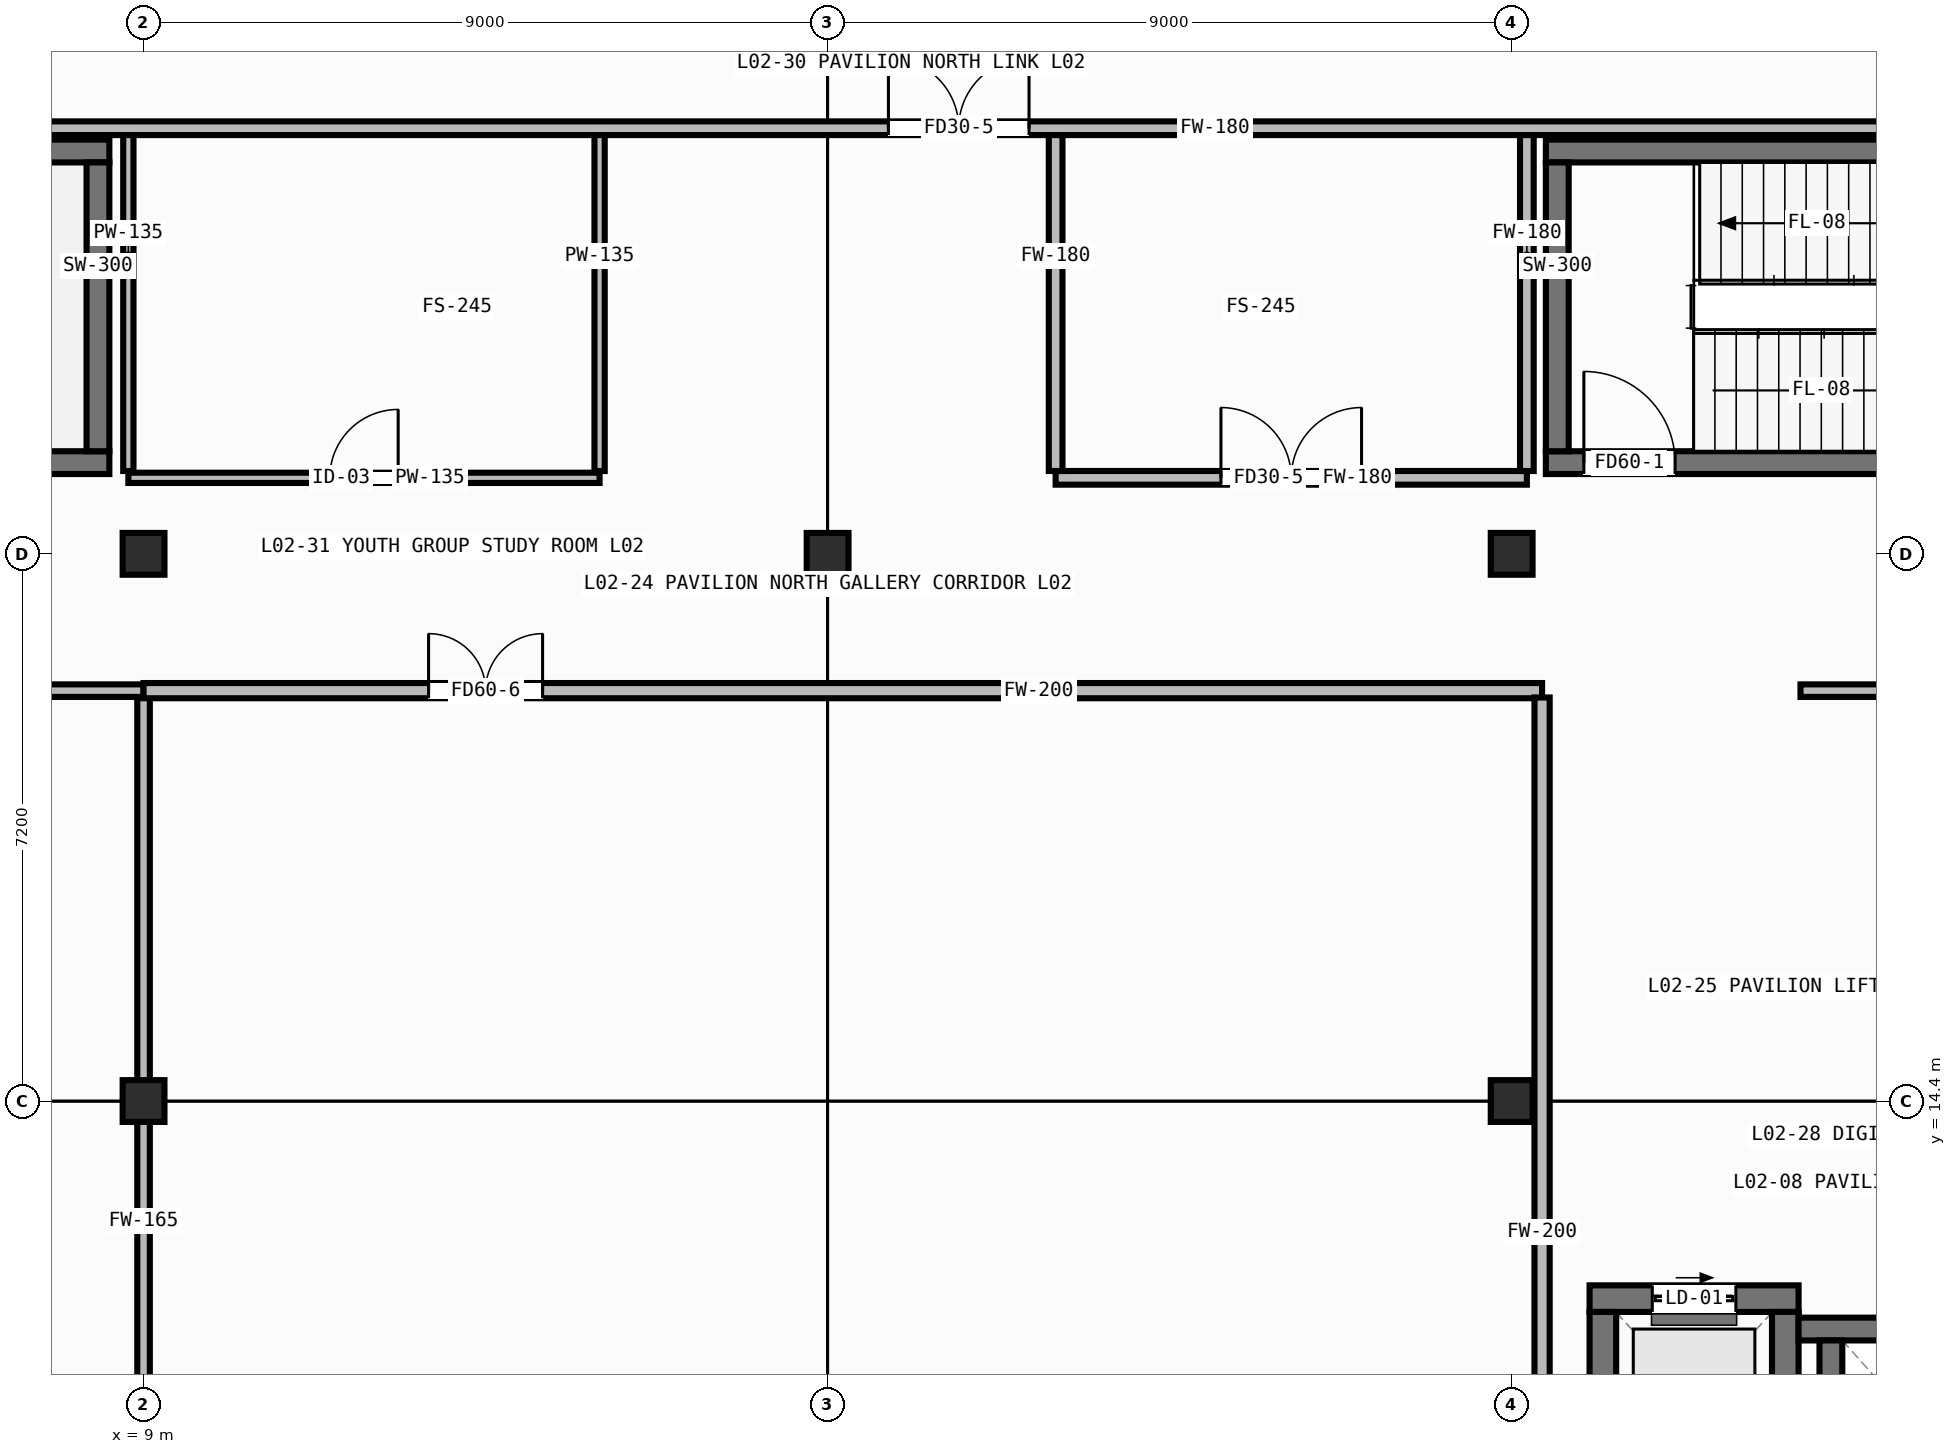
"""IFC4 building model, lengths in metres.
Left out: names, types, materials, properties, quantities, classifications, styles, units other than length and angle.
Written with IfcOpenShell. Run it as: python <this file> out.ifc"""

import sys

from ifc_helpers import new_model, si_unit, direction, frame, frame_2d, origin, origin_2d, place, context, subcontext, project, spatial, rectangle, hollow_rectangle, extrude, element, fill, save


model = new_model("IFC4")
c1 = context("Model", 3, precision=1e-05, world=origin(), true_north=direction((0.0, 1.0)))
c2 = subcontext(c1, "Body", "Model", "MODEL_VIEW")
j1 = project(units=[si_unit("LENGTHUNIT", "METRE"), si_unit("PLANEANGLEUNIT", "RADIAN")], contexts=[c1])
p1 = place(None, origin())
s1 = spatial("IfcSite", under=j1, at=p1, CompositionType="ELEMENT")
p2 = place(p1, origin())
s2 = spatial("IfcBuilding", under=s1, at=p2, CompositionType="ELEMENT")
p3 = place(p2, frame((0.0, 0.0, 4.8)))
s3 = spatial("IfcBuildingStorey", under=s2, at=p3, CompositionType="ELEMENT", Elevation=4.8)
for number, where, z_axis, x_axis in (
    (1, (9.0, 14.4, 0.0), (0.0, 0.0, 1.0), (1.0, 0.0, 0.0)),
    (2, (9.0, 21.6, 0.0), (0.0, 0.0, 1.0), (1.0, 0.0, 0.0)),
    (3, (18.0, 21.6, 0.0), (0.0, 0.0, 1.0), (1.0, 0.0, 0.0)),
    (4, (27.0, 14.4, 0.0), (0.0, 0.0, 1.0), (1.0, 0.0, 0.0)),
    (5, (27.0, 21.6, 0.0), (0.0, 0.0, 1.0), (1.0, 0.0, 0.0)),
):
    element("IfcColumn", number, at=place(p3, frame(where, z_axis=z_axis, x_axis=x_axis)), inside=s3, PredefinedType="COLUMN", context=c2, shape_type="SweptSolid", body=[
        extrude(hollow_rectangle(XDim=0.55, YDim=0.55, WallThickness=0.022, at=origin_2d()), origin(), (0.0, 0.0, 1.0), 4.0),
    ])
p4 = place(p3, frame((0.45, 22.8, 0.0), z_axis=(0.0, 0.0, 1.0), x_axis=(1.0, 0.0, 0.0)))
e6 = element("IfcWall", 6, at=p4, inside=s3, PredefinedType="SHEAR", context=c2, shape_type="SweptSolid", body=[
    extrude(rectangle(XDim=8.1, YDim=0.3, at=frame_2d((4.05, 0.0))), origin(), (0.0, 0.0, 1.0), 3.755),
])
p5 = place(p4, frame((0.5, 0.0, 0.0)))
e7 = element("IfcOpeningElement", 7, at=p5, cuts=e6, PredefinedType="OPENING", context=c2, shape_type="SweptSolid", body=[
    extrude(rectangle(XDim=1.2, YDim=2.1, at=frame_2d((0.6, 1.05))), frame((0.0, 0.162, 0.0), z_axis=(0.0, -1.0, 0.0), x_axis=(1.0, 0.0, 0.0)), (0.0, 0.0, 1.0), 0.324),
])
p6 = place(p3, frame((0.45, 26.9, 0.0), z_axis=(0.0, 0.0, 1.0), x_axis=(1.0, 0.0, 0.0)))
e8 = element("IfcWall", 8, at=p6, inside=s3, PredefinedType="SHEAR", context=c2, shape_type="SweptSolid", body=[
    extrude(rectangle(XDim=8.1, YDim=0.3, at=frame_2d((4.05, 0.0))), origin(), (0.0, 0.0, 1.0), 3.755),
])
p7 = place(p3, frame((8.4, 22.95, 0.0), z_axis=(0.0, 0.0, 1.0), x_axis=(0.0, 1.0, 0.0)))
e9 = element("IfcWall", 9, at=p7, inside=s3, PredefinedType="SHEAR", context=c2, shape_type="SweptSolid", body=[
    extrude(rectangle(XDim=3.8, YDim=0.3, at=frame_2d((1.9, 0.0))), origin(), (0.0, 0.0, 1.0), 3.755),
])
p8 = place(p3, frame((27.45, 22.8, 0.0), z_axis=(0.0, 0.0, 1.0), x_axis=(1.0, 0.0, 0.0)))
e10 = element("IfcWall", 10, at=p8, inside=s3, PredefinedType="SHEAR", context=c2, shape_type="SweptSolid", body=[
    extrude(rectangle(XDim=8.1, YDim=0.3, at=frame_2d((4.05, 0.0))), origin(), (0.0, 0.0, 1.0), 3.755),
])
p9 = place(p8, frame((0.5, 0.0, 0.0)))
e11 = element("IfcOpeningElement", 11, at=p9, cuts=e10, PredefinedType="OPENING", context=c2, shape_type="SweptSolid", body=[
    extrude(rectangle(XDim=1.2, YDim=2.1, at=frame_2d((0.6, 1.05))), frame((0.0, 0.162, 0.0), z_axis=(0.0, -1.0, 0.0), x_axis=(1.0, 0.0, 0.0)), (0.0, 0.0, 1.0), 0.324),
])
p10 = place(p3, frame((27.45, 26.9, 0.0), z_axis=(0.0, 0.0, 1.0), x_axis=(1.0, 0.0, 0.0)))
e12 = element("IfcWall", 12, at=p10, inside=s3, PredefinedType="SHEAR", context=c2, shape_type="SweptSolid", body=[
    extrude(rectangle(XDim=8.1, YDim=0.3, at=frame_2d((4.05, 0.0))), origin(), (0.0, 0.0, 1.0), 3.755),
])
p11 = place(p3, frame((27.6, 22.95, 0.0), z_axis=(0.0, 0.0, 1.0), x_axis=(0.0, 1.0, 0.0)))
e13 = element("IfcWall", 13, at=p11, inside=s3, PredefinedType="SHEAR", context=c2, shape_type="SweptSolid", body=[
    extrude(rectangle(XDim=3.8, YDim=0.3, at=frame_2d((1.9, 0.0))), origin(), (0.0, 0.0, 1.0), 3.755),
])
p12 = place(p3, frame((28.025, 11.8, 0.0), z_axis=(0.0, 0.0, 1.0), x_axis=(1.0, 0.0, 0.0)))
e14 = element("IfcWall", 14, at=p12, inside=s3, PredefinedType="SHEAR", context=c2, shape_type="SweptSolid", body=[
    extrude(rectangle(XDim=2.75, YDim=0.35, at=frame_2d((1.375, 0.0))), origin(), (0.0, 0.0, 1.0), 3.755),
])
p13 = place(p12, frame((0.825, 0.0, 0.0)))
e15 = element("IfcOpeningElement", 15, at=p13, cuts=e14, PredefinedType="OPENING", context=c2, shape_type="SweptSolid", body=[
    extrude(rectangle(XDim=1.1, YDim=2.1, at=frame_2d((0.55, 1.05))), frame((0.0, 0.187, 0.0), z_axis=(0.0, -1.0, 0.0), x_axis=(1.0, 0.0, 0.0)), (0.0, 0.0, 1.0), 0.374),
])
for number, where, z_axis, x_axis in (
    (16, (28.2, 9.375, 0.0), (0.0, 0.0, 1.0), (0.0, 1.0, 0.0)),
    (17, (30.6, 9.375, 0.0), (0.0, 0.0, 1.0), (0.0, 1.0, 0.0)),
):
    element("IfcWall", number, at=place(p3, frame(where, z_axis=z_axis, x_axis=x_axis)), inside=s3, PredefinedType="SHEAR", context=c2, shape_type="SweptSolid", body=[
        extrude(rectangle(XDim=2.25, YDim=0.35, at=frame_2d((1.125, 0.0))), origin(), (0.0, 0.0, 1.0), 3.755),
    ])
p14 = place(p3, frame((30.775, 11.4, 0.0), z_axis=(0.0, 0.0, 1.0), x_axis=(1.0, 0.0, 0.0)))
e18 = element("IfcWall", 18, at=p14, inside=s3, PredefinedType="SHEAR", context=c2, shape_type="SweptSolid", body=[
    extrude(rectangle(XDim=2.575, YDim=0.3, at=frame_2d((1.288, 0.0))), origin(), (0.0, 0.0, 1.0), 3.755),
])
p15 = place(p3, frame((31.2, 9.35, 0.0), z_axis=(0.0, 0.0, 1.0), x_axis=(0.0, 1.0, 0.0)))
e19 = element("IfcWall", 19, at=p15, inside=s3, PredefinedType="SHEAR", context=c2, shape_type="SweptSolid", body=[
    extrude(rectangle(XDim=1.9, YDim=0.3, at=frame_2d((0.95, 0.0))), origin(), (0.0, 0.0, 1.0), 3.755),
])
p16 = place(p3, frame((0.155, 19.8, 0.0), z_axis=(0.0, 0.0, 1.0), x_axis=(1.0, 0.0, 0.0)))
e20 = element("IfcWall", 20, at=p16, inside=s3, PredefinedType="PARTITIONING", context=c2, shape_type="SweptSolid", body=[
    extrude(rectangle(XDim=8.845, YDim=0.165, at=frame_2d((4.422, 0.0))), origin(), (0.0, 0.0, 1.0), 3.755),
])
p17 = place(p16, frame((3.495, 0.0, 0.0)))
e21 = element("IfcOpeningElement", 21, at=p17, cuts=e20, PredefinedType="OPENING", context=c2, shape_type="SweptSolid", body=[
    extrude(rectangle(XDim=1.7, YDim=2.12, at=frame_2d((0.85, 1.06))), frame((0.0, 0.094, 0.0), z_axis=(0.0, -1.0, 0.0), x_axis=(1.0, 0.0, 0.0)), (0.0, 0.0, 1.0), 0.189),
])
p18 = place(p3, frame((9.0, 0.585, 0.0), z_axis=(0.0, 0.0, 1.0), x_axis=(0.0, 1.0, 0.0)))
e22 = element("IfcWall", 22, at=p18, inside=s3, PredefinedType="PARTITIONING", context=c2, shape_type="SweptSolid", body=[
    extrude(rectangle(XDim=19.125, YDim=0.165, at=frame_2d((9.562, 0.0))), origin(), (0.0, 0.0, 1.0), 3.035),
])
p19 = place(p3, frame((9.0, 19.8, 0.0), z_axis=(0.0, 0.0, 1.0), x_axis=(1.0, 0.0, 0.0)))
e23 = element("IfcWall", 23, at=p19, inside=s3, PredefinedType="PARTITIONING", context=c2, shape_type="SweptSolid", body=[
    extrude(rectangle(XDim=18.4, YDim=0.2, at=frame_2d((9.2, 0.0))), origin(), (0.0, 0.0, 1.0), 3.755),
])
p20 = place(p19, frame((3.75, 0.0, 0.0)))
e24 = element("IfcOpeningElement", 24, at=p20, cuts=e23, PredefinedType="OPENING", context=c2, shape_type="SweptSolid", body=[
    extrude(rectangle(XDim=1.5, YDim=2.1, at=frame_2d((0.75, 1.05))), frame((0.0, 0.112, 0.0), z_axis=(0.0, -1.0, 0.0), x_axis=(1.0, 0.0, 0.0)), (0.0, 0.0, 1.0), 0.224),
])
p21 = place(p3, frame((27.4, 0.165, 0.0), z_axis=(0.0, 0.0, 1.0), x_axis=(0.0, 1.0, 0.0)))
e25 = element("IfcWall", 25, at=p21, inside=s3, PredefinedType="PARTITIONING", context=c2, shape_type="SweptSolid", body=[
    extrude(rectangle(XDim=19.545, YDim=0.2, at=frame_2d((9.772, 0.0))), origin(), (0.0, 0.0, 1.0), 3.755),
])
p22 = place(p3, frame((30.8, 19.8, 0.0), z_axis=(0.0, 0.0, 1.0), x_axis=(1.0, 0.0, 0.0)))
e26 = element("IfcWall", 26, at=p22, inside=s3, PredefinedType="PARTITIONING", context=c2, shape_type="SweptSolid", body=[
    extrude(rectangle(XDim=5.165, YDim=0.165, at=frame_2d((2.583, 0.0))), origin(), (0.0, 0.0, 1.0), 3.755),
])
p23 = place(p22, frame((1.75, 0.0, 0.0)))
e27 = element("IfcOpeningElement", 27, at=p23, cuts=e26, PredefinedType="OPENING", context=c2, shape_type="SweptSolid", body=[
    extrude(rectangle(XDim=1.7, YDim=2.12, at=frame_2d((0.85, 1.06))), frame((0.0, 0.094, 0.0), z_axis=(0.0, -1.0, 0.0), x_axis=(1.0, 0.0, 0.0)), (0.0, 0.0, 1.0), 0.189),
])
p24 = place(p3, frame((0.155, 27.2, 0.0), z_axis=(0.0, 0.0, 1.0), x_axis=(1.0, 0.0, 0.0)))
e28 = element("IfcWall", 28, at=p24, inside=s3, PredefinedType="PARTITIONING", context=c2, shape_type="SweptSolid", body=[
    extrude(rectangle(XDim=35.845, YDim=0.18, at=frame_2d((17.922, 0.0))), origin(), (0.0, 0.0, 1.0), 3.755),
])
p25 = place(p24, frame((18.645, 0.0, 0.0)))
e29 = element("IfcOpeningElement", 29, at=p25, cuts=e28, PredefinedType="OPENING", context=c2, shape_type="SweptSolid", body=[
    extrude(rectangle(XDim=1.85, YDim=2.12, at=frame_2d((0.925, 1.06))), frame((0.0, 0.102, 0.0), z_axis=(0.0, -1.0, 0.0), x_axis=(1.0, 0.0, 0.0)), (0.0, 0.0, 1.0), 0.204),
])
p26 = place(p3, frame((8.8, 22.6, 0.0), z_axis=(0.0, 0.0, 1.0), x_axis=(1.0, 0.0, 0.0)))
e30 = element("IfcWall", 30, at=p26, inside=s3, PredefinedType="PARTITIONING", context=c2, shape_type="SweptSolid", body=[
    extrude(rectangle(XDim=6.2, YDim=0.135, at=frame_2d((3.1, 0.0))), origin(), (0.0, 0.0, 1.0), 3.755),
])
p27 = place(p26, frame((2.65, 0.0, 0.0)))
e31 = element("IfcOpeningElement", 31, at=p27, cuts=e30, PredefinedType="OPENING", context=c2, shape_type="SweptSolid", body=[
    extrude(rectangle(XDim=0.9, YDim=2.02, at=frame_2d((0.45, 1.01))), frame((0.0, 0.08, 0.0), z_axis=(0.0, -1.0, 0.0), x_axis=(1.0, 0.0, 0.0)), (0.0, 0.0, 1.0), 0.159),
])
p28 = place(p3, frame((8.8, 22.69, 0.0), z_axis=(0.0, 0.0, 1.0), x_axis=(0.0, 1.0, 0.0)))
e32 = element("IfcWall", 32, at=p28, inside=s3, PredefinedType="PARTITIONING", context=c2, shape_type="SweptSolid", body=[
    extrude(rectangle(XDim=4.42, YDim=0.135, at=frame_2d((2.21, 0.0))), origin(), (0.0, 0.0, 1.0), 3.035),
])
p29 = place(p3, frame((15.0, 22.69, 0.0), z_axis=(0.0, 0.0, 1.0), x_axis=(0.0, 1.0, 0.0)))
e33 = element("IfcWall", 33, at=p29, inside=s3, PredefinedType="PARTITIONING", context=c2, shape_type="SweptSolid", body=[
    extrude(rectangle(XDim=4.42, YDim=0.135, at=frame_2d((2.21, 0.0))), origin(), (0.0, 0.0, 1.0), 3.755),
])
p30 = place(p3, frame((21.0, 22.6, 0.0), z_axis=(0.0, 0.0, 1.0), x_axis=(1.0, 0.0, 0.0)))
e34 = element("IfcWall", 34, at=p30, inside=s3, PredefinedType="PARTITIONING", context=c2, shape_type="SweptSolid", body=[
    extrude(rectangle(XDim=6.2, YDim=0.18, at=frame_2d((3.1, 0.0))), origin(), (0.0, 0.0, 1.0), 3.755),
])
p31 = place(p30, frame((2.175, 0.0, 0.0)))
e35 = element("IfcOpeningElement", 35, at=p31, cuts=e34, PredefinedType="OPENING", context=c2, shape_type="SweptSolid", body=[
    extrude(rectangle(XDim=1.85, YDim=2.12, at=frame_2d((0.925, 1.06))), frame((0.0, 0.102, 0.0), z_axis=(0.0, -1.0, 0.0), x_axis=(1.0, 0.0, 0.0)), (0.0, 0.0, 1.0), 0.204),
])
p32 = place(p3, frame((21.0, 22.69, 0.0), z_axis=(0.0, 0.0, 1.0), x_axis=(0.0, 1.0, 0.0)))
e36 = element("IfcWall", 36, at=p32, inside=s3, PredefinedType="PARTITIONING", context=c2, shape_type="SweptSolid", body=[
    extrude(rectangle(XDim=4.42, YDim=0.18, at=frame_2d((2.21, 0.0))), origin(), (0.0, 0.0, 1.0), 3.755),
])
p33 = place(p3, frame((27.2, 22.69, 0.0), z_axis=(0.0, 0.0, 1.0), x_axis=(0.0, 1.0, 0.0)))
e37 = element("IfcWall", 37, at=p33, inside=s3, PredefinedType="PARTITIONING", context=c2, shape_type="SweptSolid", body=[
    extrude(rectangle(XDim=4.42, YDim=0.18, at=frame_2d((2.21, 0.0))), origin(), (0.0, 0.0, 1.0), 3.035),
])
p34 = place(p9, origin())
e38 = element("IfcDoor", 38, at=p34, inside=s3, OperationType="SINGLE_SWING_LEFT", PredefinedType="DOOR", context=c2, shape_type="SweptSolid", body=[
    extrude(rectangle(XDim=1.2, YDim=2.1, at=frame_2d((0.6, 1.05))), frame((0.0, 0.025, 0.0), z_axis=(0.0, -1.0, 0.0), x_axis=(1.0, 0.0, 0.0)), (0.0, 0.0, 1.0), 0.05),
])
fill(e11, e38)
p35 = place(p13, origin())
e39 = element("IfcDoor", 39, at=p35, inside=s3, OperationType="SLIDING_TO_RIGHT", PredefinedType="DOOR", context=c2, shape_type="SweptSolid", body=[
    extrude(rectangle(XDim=1.1, YDim=2.1, at=frame_2d((0.55, 1.05))), frame((0.0, 0.025, 0.0), z_axis=(0.0, -1.0, 0.0), x_axis=(1.0, 0.0, 0.0)), (0.0, 0.0, 1.0), 0.05),
])
fill(e15, e39)
p36 = place(p20, origin())
e40 = element("IfcDoor", 40, at=p36, inside=s3, OperationType="DOUBLE_DOOR_SINGLE_SWING", PredefinedType="DOOR", context=c2, shape_type="SweptSolid", body=[
    extrude(rectangle(XDim=1.5, YDim=2.1, at=frame_2d((0.75, 1.05))), frame((0.0, 0.025, 0.0), z_axis=(0.0, -1.0, 0.0), x_axis=(1.0, 0.0, 0.0)), (0.0, 0.0, 1.0), 0.05),
])
fill(e24, e40)
p37 = place(p25, origin())
e41 = element("IfcDoor", 41, at=p37, inside=s3, OperationType="DOUBLE_DOOR_SINGLE_SWING", PredefinedType="DOOR", context=c2, shape_type="SweptSolid", body=[
    extrude(rectangle(XDim=1.85, YDim=2.12, at=frame_2d((0.925, 1.06))), frame((0.0, 0.025, 0.0), z_axis=(0.0, -1.0, 0.0), x_axis=(1.0, 0.0, 0.0)), (0.0, 0.0, 1.0), 0.05),
])
fill(e29, e41)
p38 = place(p27, origin())
e42 = element("IfcDoor", 42, at=p38, inside=s3, OperationType="SINGLE_SWING_RIGHT", PredefinedType="DOOR", context=c2, shape_type="SweptSolid", body=[
    extrude(rectangle(XDim=0.9, YDim=2.02, at=frame_2d((0.45, 1.01))), frame((0.0, 0.025, 0.0), z_axis=(0.0, -1.0, 0.0), x_axis=(1.0, 0.0, 0.0)), (0.0, 0.0, 1.0), 0.05),
])
fill(e31, e42)
p39 = place(p31, origin())
e43 = element("IfcDoor", 43, at=p39, inside=s3, OperationType="DOUBLE_DOOR_SINGLE_SWING", PredefinedType="DOOR", context=c2, shape_type="SweptSolid", body=[
    extrude(rectangle(XDim=1.85, YDim=2.12, at=frame_2d((0.925, 1.06))), frame((0.0, 0.025, 0.0), z_axis=(0.0, -1.0, 0.0), x_axis=(1.0, 0.0, 0.0)), (0.0, 0.0, 1.0), 0.05),
])
fill(e35, e43)
save(model, sys.argv[1])
